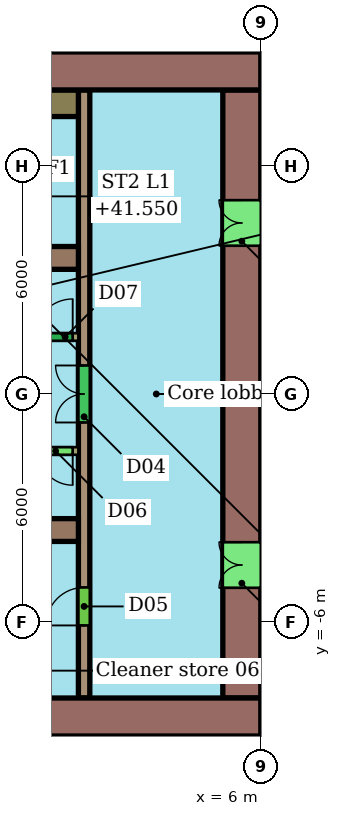
"""IFC4 building model, lengths in metres.
Left out: names, types, materials, properties, quantities, classifications, styles, units other than length and angle.
Written with IfcOpenShell. Run it as: python <this file> out.ifc"""

import sys

from ifc_helpers import new_model, si_unit, direction, frame, frame_2d, origin, place, context, subcontext, project, spatial, rectangle, extrude, element, fill, save


model = new_model("IFC4")
c1 = context("Model", 3, precision=1e-05, world=origin(), true_north=direction((0.0, 1.0)))
c2 = subcontext(c1, "Body", "Model", "MODEL_VIEW")
j1 = project(units=[si_unit("LENGTHUNIT", "METRE"), si_unit("PLANEANGLEUNIT", "RADIAN")], contexts=[c1])
p1 = place(None, origin())
s1 = spatial("IfcSite", under=j1, at=p1, CompositionType="ELEMENT")
p2 = place(p1, origin())
s2 = spatial("IfcBuilding", under=s1, at=p2, CompositionType="ELEMENT")
p3 = place(p2, frame((0.0, 0.0, 39.7)))
s3 = spatial("IfcBuildingStorey", under=s2, at=p3, CompositionType="ELEMENT", Elevation=39.7)
p4 = place(p3, frame((6.0, 8.5, 0.0), z_axis=(0.0, 0.0, 1.0), x_axis=(-1.0, 0.0, 0.0)))
e1 = element("IfcWall", 1, at=p4, inside=s3, PredefinedType="SHEAR", context=c2, shape_type="SweptSolid", body=[
    extrude(rectangle(XDim=12.0, YDim=1.0, at=frame_2d((6.0, 0.0))), origin(), (0.0, 0.0, 1.0), 3.4),
])
p5 = place(p4, frame((5.6, 0.0, 0.0)))
e2 = element("IfcOpeningElement", 2, at=p5, cuts=e1, PredefinedType="OPENING", context=c2, shape_type="SweptSolid", body=[
    extrude(rectangle(XDim=1.2, YDim=2.1, at=frame_2d((0.6, 1.05))), frame((0.0, 0.51, 0.0), z_axis=(0.0, -1.0, 0.0), x_axis=(1.0, 0.0, 0.0)), (0.0, 0.0, 1.0), 1.02),
])
p6 = place(p3, frame((-18.0, -8.5, 0.0), z_axis=(0.0, 0.0, 1.0), x_axis=(1.0, 0.0, 0.0)))
e3 = element("IfcWall", 3, at=p6, inside=s3, PredefinedType="SHEAR", context=c2, shape_type="SweptSolid", body=[
    extrude(rectangle(XDim=24.0, YDim=1.0, at=frame_2d((12.0, 0.0))), origin(), (0.0, 0.0, 1.0), 3.4),
])
p7 = place(p6, frame((6.0, 0.0, 0.0)))
e4 = element("IfcOpeningElement", 4, at=p7, cuts=e3, PredefinedType="OPENING", context=c2, shape_type="SweptSolid", body=[
    extrude(rectangle(XDim=1.2, YDim=2.1, at=frame_2d((0.6, 1.05))), frame((0.0, 0.51, 0.0), z_axis=(0.0, -1.0, 0.0), x_axis=(1.0, 0.0, 0.0)), (0.0, 0.0, 1.0), 1.02),
])
p8 = place(p3, frame((5.5, -8.0, 0.0), z_axis=(0.0, 0.0, 1.0), x_axis=(0.0, 1.0, 0.0)))
e5 = element("IfcWall", 5, at=p8, inside=s3, PredefinedType="SHEAR", context=c2, shape_type="SweptSolid", body=[
    extrude(rectangle(XDim=16.0, YDim=1.0, at=frame_2d((8.0, 0.0))), origin(), (0.0, 0.0, 1.0), 3.4),
])
p9 = place(p8, frame((2.9, 0.0, 0.0)))
e6 = element("IfcOpeningElement", 6, at=p9, cuts=e5, PredefinedType="OPENING", context=c2, shape_type="SweptSolid", body=[
    extrude(rectangle(XDim=1.2, YDim=2.1, at=frame_2d((0.6, 1.05))), frame((0.0, 0.51, 0.0), z_axis=(0.0, -1.0, 0.0), x_axis=(1.0, 0.0, 0.0)), (0.0, 0.0, 1.0), 1.02),
])
p10 = place(p8, frame((11.9, 0.0, 0.0)))
e7 = element("IfcOpeningElement", 7, at=p10, cuts=e5, PredefinedType="OPENING", context=c2, shape_type="SweptSolid", body=[
    extrude(rectangle(XDim=1.2, YDim=2.1, at=frame_2d((0.6, 1.05))), frame((0.0, 0.51, 0.0), z_axis=(0.0, -1.0, 0.0), x_axis=(1.0, 0.0, 0.0)), (0.0, 0.0, 1.0), 1.02),
])
for number, where, z_axis, x_axis in (
    (8, (-6.0, 3.58, 0.0), (0.0, 0.0, 1.0), (1.0, 0.0, 0.0)),
    (9, (-6.0, -3.58, 0.0), (0.0, 0.0, 1.0), (1.0, 0.0, 0.0)),
):
    element("IfcWall", number, at=place(p3, frame(where, z_axis=z_axis, x_axis=x_axis)), inside=s3, PredefinedType="SHEAR", context=c2, shape_type="SweptSolid", body=[
        extrude(rectangle(XDim=7.2, YDim=0.6, at=frame_2d((3.6, 0.0))), origin(), (0.0, 0.0, 1.0), 3.4),
    ])
p11 = place(p3, frame((1.35, -8.0, 0.0), z_axis=(0.0, 0.0, 1.0), x_axis=(0.0, 1.0, 0.0)))
e10 = element("IfcWall", 10, at=p11, inside=s3, PredefinedType="SHEAR", context=c2, shape_type="SweptSolid", body=[
    extrude(rectangle(XDim=16.0, YDim=0.3, at=frame_2d((8.0, 0.0))), origin(), (0.0, 0.0, 1.0), 3.4),
])
p12 = place(p11, frame((1.91, 0.0, 0.0)))
e11 = element("IfcOpeningElement", 11, at=p12, cuts=e10, PredefinedType="OPENING", context=c2, shape_type="SweptSolid", body=[
    extrude(rectangle(XDim=1.0, YDim=2.1, at=frame_2d((0.5, 1.05))), frame((0.0, 0.16, 0.0), z_axis=(0.0, -1.0, 0.0), x_axis=(1.0, 0.0, 0.0)), (0.0, 0.0, 1.0), 0.32),
])
p13 = place(p11, frame((7.25, 0.0, 0.0)))
e12 = element("IfcOpeningElement", 12, at=p13, cuts=e10, PredefinedType="OPENING", context=c2, shape_type="SweptSolid", body=[
    extrude(rectangle(XDim=1.5, YDim=2.1, at=frame_2d((0.75, 1.05))), frame((0.0, 0.16, 0.0), z_axis=(0.0, -1.0, 0.0), x_axis=(1.0, 0.0, 0.0)), (0.0, 0.0, 1.0), 0.32),
])
p14 = place(p3, frame((-13.2, 1.5, 0.0), z_axis=(0.0, 0.0, 1.0), x_axis=(1.0, 0.0, 0.0)))
e13 = element("IfcWall", 13, at=p14, inside=s3, PredefinedType="SHEAR", context=c2, shape_type="SweptSolid", body=[
    extrude(rectangle(XDim=14.4, YDim=0.2, at=frame_2d((7.2, 0.0))), origin(), (0.0, 0.0, 1.0), 3.4),
])
p15 = place(p14, frame((0.546, 0.0, 0.0)))
e14 = element("IfcOpeningElement", 14, at=p15, cuts=e13, PredefinedType="OPENING", context=c2, shape_type="SweptSolid", body=[
    extrude(rectangle(XDim=1.1, YDim=2.1, at=frame_2d((0.55, 1.05))), frame((0.0, 0.11, 0.0), z_axis=(0.0, -1.0, 0.0), x_axis=(1.0, 0.0, 0.0)), (0.0, 0.0, 1.0), 0.22),
])
p16 = place(p14, frame((2.988, 0.0, 0.0)))
e15 = element("IfcOpeningElement", 15, at=p16, cuts=e13, PredefinedType="OPENING", context=c2, shape_type="SweptSolid", body=[
    extrude(rectangle(XDim=1.1, YDim=2.1, at=frame_2d((0.55, 1.05))), frame((0.0, 0.11, 0.0), z_axis=(0.0, -1.0, 0.0), x_axis=(1.0, 0.0, 0.0)), (0.0, 0.0, 1.0), 0.22),
])
p17 = place(p14, frame((5.429, 0.0, 0.0)))
e16 = element("IfcOpeningElement", 16, at=p17, cuts=e13, PredefinedType="OPENING", context=c2, shape_type="SweptSolid", body=[
    extrude(rectangle(XDim=1.1, YDim=2.1, at=frame_2d((0.55, 1.05))), frame((0.0, 0.11, 0.0), z_axis=(0.0, -1.0, 0.0), x_axis=(1.0, 0.0, 0.0)), (0.0, 0.0, 1.0), 0.22),
])
p18 = place(p14, frame((7.871, 0.0, 0.0)))
e17 = element("IfcOpeningElement", 17, at=p18, cuts=e13, PredefinedType="OPENING", context=c2, shape_type="SweptSolid", body=[
    extrude(rectangle(XDim=1.1, YDim=2.1, at=frame_2d((0.55, 1.05))), frame((0.0, 0.11, 0.0), z_axis=(0.0, -1.0, 0.0), x_axis=(1.0, 0.0, 0.0)), (0.0, 0.0, 1.0), 0.22),
])
p19 = place(p14, frame((11.607, 0.0, 0.0)))
e18 = element("IfcOpeningElement", 18, at=p19, cuts=e13, PredefinedType="OPENING", context=c2, shape_type="SweptSolid", body=[
    extrude(rectangle(XDim=0.9, YDim=2.1, at=frame_2d((0.45, 1.05))), frame((0.0, 0.11, 0.0), z_axis=(0.0, -1.0, 0.0), x_axis=(1.0, 0.0, 0.0)), (0.0, 0.0, 1.0), 0.22),
])
p20 = place(p14, frame((13.25, 0.0, 0.0)))
e19 = element("IfcOpeningElement", 19, at=p20, cuts=e13, PredefinedType="OPENING", context=c2, shape_type="SweptSolid", body=[
    extrude(rectangle(XDim=1.0, YDim=2.1, at=frame_2d((0.5, 1.05))), frame((0.0, 0.11, 0.0), z_axis=(0.0, -1.0, 0.0), x_axis=(1.0, 0.0, 0.0)), (0.0, 0.0, 1.0), 0.22),
])
p21 = place(p3, frame((1.2, -1.5, 0.0), z_axis=(0.0, 0.0, 1.0), x_axis=(-1.0, 0.0, 0.0)))
e20 = element("IfcWall", 20, at=p21, inside=s3, PredefinedType="SHEAR", context=c2, shape_type="SweptSolid", body=[
    extrude(rectangle(XDim=14.4, YDim=0.2, at=frame_2d((7.2, 0.0))), origin(), (0.0, 0.0, 1.0), 3.4),
])
p22 = place(p21, frame((7.821, 0.0, 0.0)))
e21 = element("IfcOpeningElement", 21, at=p22, cuts=e20, PredefinedType="OPENING", context=c2, shape_type="SweptSolid", body=[
    extrude(rectangle(XDim=1.2, YDim=2.1, at=frame_2d((0.6, 1.05))), frame((0.0, 0.11, 0.0), z_axis=(0.0, -1.0, 0.0), x_axis=(1.0, 0.0, 0.0)), (0.0, 0.0, 1.0), 0.22),
])
p23 = place(p21, frame((0.15, 0.0, 0.0)))
e22 = element("IfcOpeningElement", 22, at=p23, cuts=e20, PredefinedType="OPENING", context=c2, shape_type="SweptSolid", body=[
    extrude(rectangle(XDim=0.9, YDim=2.1, at=frame_2d((0.45, 1.05))), frame((0.0, 0.11, 0.0), z_axis=(0.0, -1.0, 0.0), x_axis=(1.0, 0.0, 0.0)), (0.0, 0.0, 1.0), 0.22),
])
p24 = place(p3, frame((0.4, 7.65, 0.0), z_axis=(0.0, 0.0, 1.0), x_axis=(1.0, 0.0, 0.0)))
e23 = element("IfcWall", 23, at=p24, inside=s3, PredefinedType="SHEAR", context=c2, shape_type="SweptSolid", body=[
    extrude(rectangle(XDim=0.8, YDim=0.7, at=frame_2d((0.4, 0.0))), origin(), (0.0, 0.0, 1.0), 3.4),
])
p25 = place(p9, origin())
e24 = element("IfcDoor", 24, at=p25, inside=s3, OperationType="DOUBLE_DOOR_SINGLE_SWING", PredefinedType="NOTDEFINED", context=c2, shape_type="SweptSolid", body=[
    extrude(rectangle(XDim=1.2, YDim=2.1, at=frame_2d((0.6, 1.05))), frame((0.0, 0.025, 0.0), z_axis=(0.0, -1.0, 0.0), x_axis=(1.0, 0.0, 0.0)), (0.0, 0.0, 1.0), 0.05),
])
fill(e6, e24)
p26 = place(p10, origin())
e25 = element("IfcDoor", 25, at=p26, inside=s3, OperationType="DOUBLE_DOOR_SINGLE_SWING", PredefinedType="NOTDEFINED", context=c2, shape_type="SweptSolid", body=[
    extrude(rectangle(XDim=1.2, YDim=2.1, at=frame_2d((0.6, 1.05))), frame((0.0, 0.025, 0.0), z_axis=(0.0, -1.0, 0.0), x_axis=(1.0, 0.0, 0.0)), (0.0, 0.0, 1.0), 0.05),
])
fill(e7, e25)
p27 = place(p12, origin())
e26 = element("IfcDoor", 26, at=p27, inside=s3, OperationType="SINGLE_SWING_LEFT", PredefinedType="NOTDEFINED", context=c2, shape_type="SweptSolid", body=[
    extrude(rectangle(XDim=1.0, YDim=2.1, at=frame_2d((0.5, 1.05))), frame((0.0, 0.025, 0.0), z_axis=(0.0, -1.0, 0.0), x_axis=(1.0, 0.0, 0.0)), (0.0, 0.0, 1.0), 0.05),
])
fill(e11, e26)
p28 = place(p13, origin())
e27 = element("IfcDoor", 27, at=p28, inside=s3, OperationType="DOUBLE_DOOR_SINGLE_SWING", PredefinedType="NOTDEFINED", context=c2, shape_type="SweptSolid", body=[
    extrude(rectangle(XDim=1.5, YDim=2.1, at=frame_2d((0.75, 1.05))), frame((0.0, 0.025, 0.0), z_axis=(0.0, -1.0, 0.0), x_axis=(1.0, 0.0, 0.0)), (0.0, 0.0, 1.0), 0.05),
])
fill(e12, e27)
p29 = place(p20, origin())
e28 = element("IfcDoor", 28, at=p29, inside=s3, OperationType="SINGLE_SWING_RIGHT", PredefinedType="NOTDEFINED", context=c2, shape_type="SweptSolid", body=[
    extrude(rectangle(XDim=1.0, YDim=2.1, at=frame_2d((0.5, 1.05))), frame((0.0, 0.025, 0.0), z_axis=(0.0, -1.0, 0.0), x_axis=(1.0, 0.0, 0.0)), (0.0, 0.0, 1.0), 0.05),
])
fill(e19, e28)
p30 = place(p23, origin())
e29 = element("IfcDoor", 29, at=p30, inside=s3, OperationType="SINGLE_SWING_LEFT", PredefinedType="NOTDEFINED", context=c2, shape_type="SweptSolid", body=[
    extrude(rectangle(XDim=0.9, YDim=2.1, at=frame_2d((0.45, 1.05))), frame((0.0, 0.025, 0.0), z_axis=(0.0, -1.0, 0.0), x_axis=(1.0, 0.0, 0.0)), (0.0, 0.0, 1.0), 0.05),
])
fill(e22, e29)
save(model, sys.argv[1])
